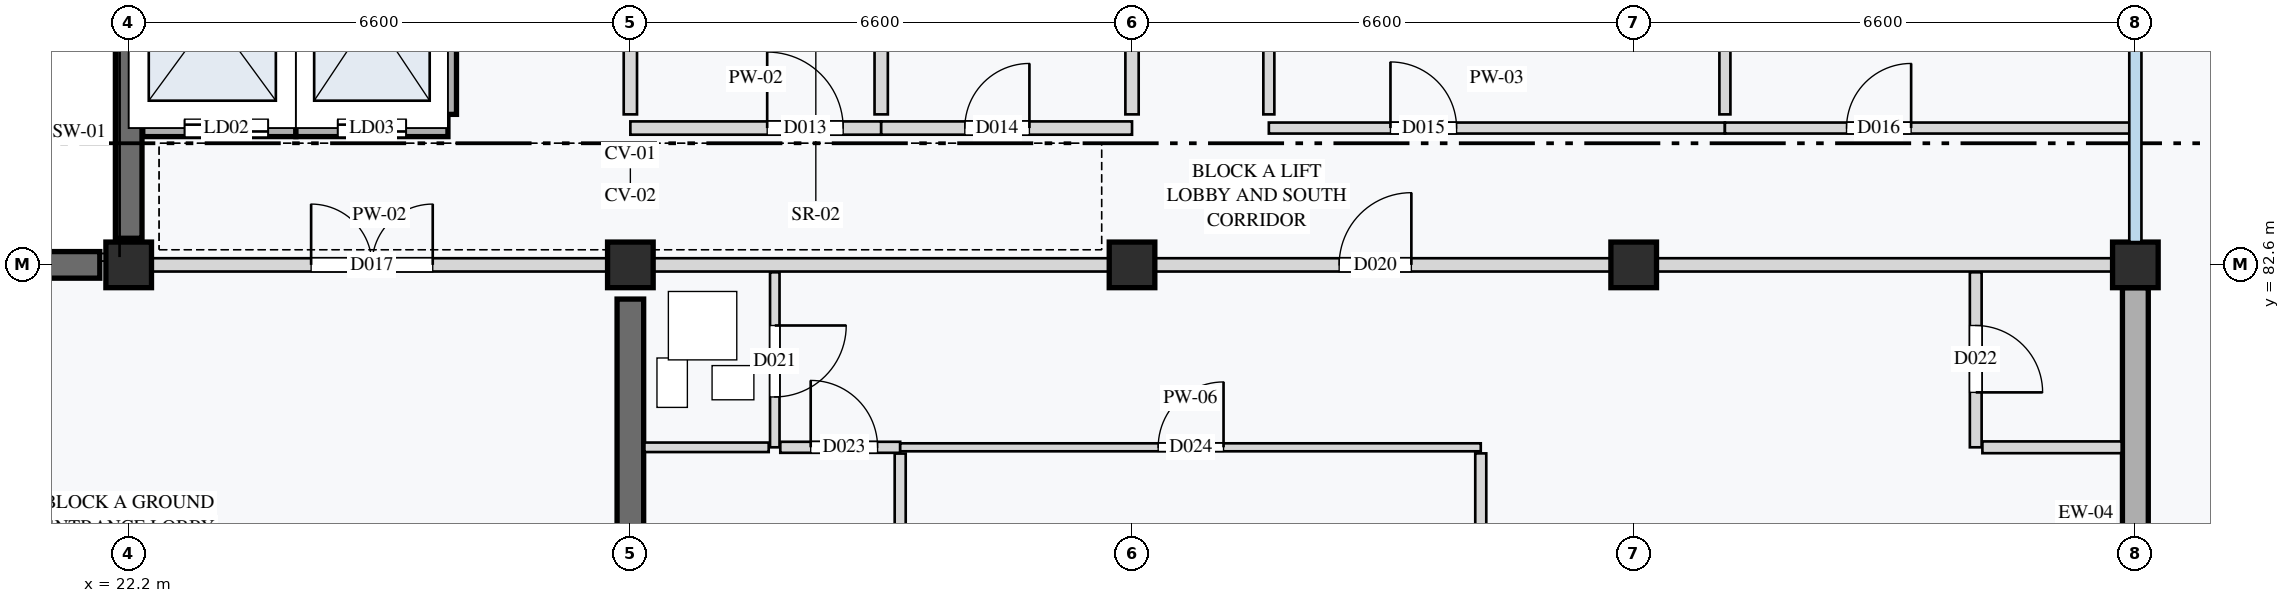
"""IFC4 building model, lengths in metres.
Left out: names, types, materials, properties, quantities, classifications, styles, units other than length and angle.
Written with IfcOpenShell. Run it as: python <this file> out.ifc"""

import sys

from ifc_helpers import new_model, si_unit, direction, frame, frame_2d, origin, origin_2d, place, context, subcontext, project, spatial, rectangle, extrude, element, fill, save


model = new_model("IFC4")
c1 = context("Model", 3, precision=1e-05, world=origin(), true_north=direction((0.0, 1.0)))
c2 = subcontext(c1, "Body", "Model", "MODEL_VIEW")
j1 = project(units=[si_unit("LENGTHUNIT", "METRE"), si_unit("PLANEANGLEUNIT", "RADIAN")], contexts=[c1])
p1 = place(None, origin())
s1 = spatial("IfcSite", under=j1, at=p1, CompositionType="ELEMENT")
p2 = place(p1, origin())
s2 = spatial("IfcBuilding", under=s1, at=p2, CompositionType="ELEMENT")
p3 = place(p2, origin())
s3 = spatial("IfcBuildingStorey", under=s2, at=p3, CompositionType="ELEMENT", Elevation=0.0)
for number, where, z_axis, x_axis in (
    (1, (22.2, 82.6, 0.0), (0.0, 0.0, 1.0), (1.0, 0.0, 0.0)),
    (2, (28.8, 82.6, 0.0), (0.0, 0.0, 1.0), (1.0, 0.0, 0.0)),
    (3, (35.4, 82.6, 0.0), (0.0, 0.0, 1.0), (1.0, 0.0, 0.0)),
    (4, (42.0, 82.6, 0.0), (0.0, 0.0, 1.0), (1.0, 0.0, 0.0)),
    (5, (48.6, 82.6, 0.0), (0.0, 0.0, 1.0), (1.0, 0.0, 0.0)),
):
    element("IfcColumn", number, at=place(p3, frame(where, z_axis=z_axis, x_axis=x_axis)), inside=s3, PredefinedType="COLUMN", context=c2, shape_type="SweptSolid", body=[
        extrude(rectangle(XDim=0.6, YDim=0.6, at=origin_2d()), origin(), (0.0, 0.0, 1.0), 4.2),
    ])
p4 = place(p3, frame((15.98, 82.6, 0.0), z_axis=(0.0, 0.0, 1.0), x_axis=(1.0, 0.0, 0.0)))
e6 = element("IfcWall", 6, at=p4, inside=s3, PredefinedType="SHEAR", context=c2, shape_type="SweptSolid", body=[
    extrude(rectangle(XDim=5.84, YDim=0.35, at=frame_2d((2.92, 0.0))), origin(), (0.0, 0.0, 1.0), 3.92),
])
p5 = place(p3, frame((22.2, 82.95, 0.0), z_axis=(0.0, 0.0, 1.0), x_axis=(0.0, 1.0, 0.0)))
e7 = element("IfcWall", 7, at=p5, inside=s3, PredefinedType="SHEAR", context=c2, shape_type="SweptSolid", body=[
    extrude(rectangle(XDim=2.8, YDim=0.35, at=frame_2d((1.4, 0.0))), origin(), (0.0, 0.0, 1.0), 3.92),
])
p6 = place(p3, frame((28.8, 76.45, 0.0), z_axis=(0.0, 0.0, 1.0), x_axis=(0.0, 1.0, 0.0)))
e8 = element("IfcWall", 8, at=p6, inside=s3, PredefinedType="SHEAR", context=c2, shape_type="SweptSolid", body=[
    extrude(rectangle(XDim=5.7, YDim=0.35, at=frame_2d((2.85, 0.0))), origin(), (0.0, 0.0, 1.0), 3.92),
])
p7 = place(p3, frame((48.6, 76.375, 0.0), z_axis=(0.0, 0.0, 1.0), x_axis=(0.0, 1.0, 0.0)))
e9 = element("IfcWall", 9, at=p7, inside=s3, PredefinedType="STANDARD", context=c2, shape_type="SweptSolid", body=[
    extrude(rectangle(XDim=5.925, YDim=0.34, at=frame_2d((2.962, 0.0))), origin(), (0.0, 0.0, 1.0), 3.65),
])
p8 = place(p3, frame((22.385, 84.4, 0.0), z_axis=(0.0, 0.0, 1.0), x_axis=(1.0, 0.0, 0.0)))
e10 = element("IfcWall", 10, at=p8, inside=s3, PredefinedType="STANDARD", context=c2, shape_type="SweptSolid", body=[
    extrude(rectangle(XDim=2.015, YDim=0.225, at=frame_2d((1.007, 0.0))), origin(), (0.0, 0.0, 1.0), 3.92),
])
p9 = place(p8, frame((0.55, 0.0, 0.0)))
e11 = element("IfcOpeningElement", 11, at=p9, cuts=e10, PredefinedType="OPENING", context=c2, shape_type="SweptSolid", body=[
    extrude(rectangle(XDim=1.1, YDim=2.1, at=frame_2d((0.55, 1.05))), frame((0.0, 0.123, 0.0), z_axis=(0.0, -1.0, 0.0), x_axis=(1.0, 0.0, 0.0)), (0.0, 0.0, 1.0), 0.245),
])
p10 = place(p3, frame((24.4, 84.4, 0.0), z_axis=(0.0, 0.0, 1.0), x_axis=(1.0, 0.0, 0.0)))
e12 = element("IfcWall", 12, at=p10, inside=s3, PredefinedType="STANDARD", context=c2, shape_type="SweptSolid", body=[
    extrude(rectangle(XDim=2.0, YDim=0.225, at=frame_2d((1.0, 0.0))), origin(), (0.0, 0.0, 1.0), 3.92),
])
p11 = place(p10, frame((0.55, 0.0, 0.0)))
e13 = element("IfcOpeningElement", 13, at=p11, cuts=e12, PredefinedType="OPENING", context=c2, shape_type="SweptSolid", body=[
    extrude(rectangle(XDim=0.9, YDim=2.1, at=frame_2d((0.45, 1.05))), frame((0.0, 0.123, 0.0), z_axis=(0.0, -1.0, 0.0), x_axis=(1.0, 0.0, 0.0)), (0.0, 0.0, 1.0), 0.245),
])
for number, where, z_axis, x_axis in (
    (14, (24.4, 84.58, 0.0), (0.0, 0.0, 1.0), (0.0, 1.0, 0.0)),
    (15, (26.4, 84.58, 0.0), (0.0, 0.0, 1.0), (0.0, 1.0, 0.0)),
):
    element("IfcWall", number, at=place(p3, frame(where, z_axis=z_axis, x_axis=x_axis)), inside=s3, PredefinedType="STANDARD", context=c2, shape_type="SweptSolid", body=[
        extrude(rectangle(XDim=2.64, YDim=0.225, at=frame_2d((1.32, 0.0))), origin(), (0.0, 0.0, 1.0), 3.92),
    ])
p12 = place(p3, frame((28.8, 84.4, 0.0), z_axis=(0.0, 0.0, 1.0), x_axis=(1.0, 0.0, 0.0)))
e16 = element("IfcWall", 16, at=p12, inside=s3, PredefinedType="PARTITIONING", context=c2, shape_type="SweptSolid", body=[
    extrude(rectangle(XDim=3.3, YDim=0.175, at=frame_2d((1.65, 0.0))), origin(), (0.0, 0.0, 1.0), 3.92),
])
p13 = place(p12, frame((1.8, 0.0, 0.0)))
e17 = element("IfcOpeningElement", 17, at=p13, cuts=e16, PredefinedType="OPENING", context=c2, shape_type="SweptSolid", body=[
    extrude(rectangle(XDim=1.0, YDim=2.1, at=frame_2d((0.5, 1.05))), frame((0.0, 0.097, 0.0), z_axis=(0.0, -1.0, 0.0), x_axis=(1.0, 0.0, 0.0)), (0.0, 0.0, 1.0), 0.195),
])
p14 = place(p3, frame((32.1, 84.4, 0.0), z_axis=(0.0, 0.0, 1.0), x_axis=(1.0, 0.0, 0.0)))
e18 = element("IfcWall", 18, at=p14, inside=s3, PredefinedType="PARTITIONING", context=c2, shape_type="SweptSolid", body=[
    extrude(rectangle(XDim=3.3, YDim=0.175, at=frame_2d((1.65, 0.0))), origin(), (0.0, 0.0, 1.0), 3.92),
])
p15 = place(p14, frame((1.1, 0.0, 0.0)))
e19 = element("IfcOpeningElement", 19, at=p15, cuts=e18, PredefinedType="OPENING", context=c2, shape_type="SweptSolid", body=[
    extrude(rectangle(XDim=0.85, YDim=2.0, at=frame_2d((0.425, 1.0))), frame((0.0, 0.097, 0.0), z_axis=(0.0, -1.0, 0.0), x_axis=(1.0, 0.0, 0.0)), (0.0, 0.0, 1.0), 0.195),
])
p16 = place(p3, frame((28.8, 84.58, 0.0), z_axis=(0.0, 0.0, 1.0), x_axis=(0.0, 1.0, 0.0)))
e20 = element("IfcWall", 20, at=p16, inside=s3, PredefinedType="PARTITIONING", context=c2, shape_type="SweptSolid", body=[
    extrude(rectangle(XDim=1.14, YDim=0.175, at=frame_2d((0.57, 0.0))), origin(), (0.0, 0.0, 1.0), 3.75),
])
for number, where, z_axis, x_axis in (
    (21, (32.1, 84.58, 0.0), (0.0, 0.0, 1.0), (0.0, 1.0, 0.0)),
    (22, (35.4, 84.58, 0.0), (0.0, 0.0, 1.0), (0.0, 1.0, 0.0)),
):
    element("IfcWall", number, at=place(p3, frame(where, z_axis=z_axis, x_axis=x_axis)), inside=s3, PredefinedType="PARTITIONING", context=c2, shape_type="SweptSolid", body=[
        extrude(rectangle(XDim=1.14, YDim=0.175, at=frame_2d((0.57, 0.0))), origin(), (0.0, 0.0, 1.0), 3.92),
    ])
p17 = place(p3, frame((37.2, 84.4, 0.0), z_axis=(0.0, 0.0, 1.0), x_axis=(1.0, 0.0, 0.0)))
e23 = element("IfcWall", 23, at=p17, inside=s3, PredefinedType="PARTITIONING", context=c2, shape_type="SweptSolid", body=[
    extrude(rectangle(XDim=6.0, YDim=0.145, at=frame_2d((3.0, 0.0))), origin(), (0.0, 0.0, 1.0), 3.92),
])
p18 = place(p17, frame((1.6, 0.0, 0.0)))
e24 = element("IfcOpeningElement", 24, at=p18, cuts=e23, PredefinedType="OPENING", context=c2, shape_type="SweptSolid", body=[
    extrude(rectangle(XDim=0.87, YDim=2.08, at=frame_2d((0.435, 1.04))), frame((0.0, 0.083, 0.0), z_axis=(0.0, -1.0, 0.0), x_axis=(1.0, 0.0, 0.0)), (0.0, 0.0, 1.0), 0.165),
])
p19 = place(p3, frame((43.2, 84.4, 0.0), z_axis=(0.0, 0.0, 1.0), x_axis=(1.0, 0.0, 0.0)))
e25 = element("IfcWall", 25, at=p19, inside=s3, PredefinedType="PARTITIONING", context=c2, shape_type="SweptSolid", body=[
    extrude(rectangle(XDim=5.4, YDim=0.145, at=frame_2d((2.7, 0.0))), origin(), (0.0, 0.0, 1.0), 3.92),
])
p20 = place(p19, frame((1.6, 0.0, 0.0)))
e26 = element("IfcOpeningElement", 26, at=p20, cuts=e25, PredefinedType="OPENING", context=c2, shape_type="SweptSolid", body=[
    extrude(rectangle(XDim=0.85, YDim=2.1, at=frame_2d((0.425, 1.05))), frame((0.0, 0.083, 0.0), z_axis=(0.0, -1.0, 0.0), x_axis=(1.0, 0.0, 0.0)), (0.0, 0.0, 1.0), 0.165),
])
for number, where, z_axis, x_axis in (
    (27, (43.2, 84.58, 0.0), (0.0, 0.0, 1.0), (0.0, 1.0, 0.0)),
    (28, (37.2, 84.58, 0.0), (0.0, 0.0, 1.0), (0.0, 1.0, 0.0)),
):
    element("IfcWall", number, at=place(p3, frame(where, z_axis=z_axis, x_axis=x_axis)), inside=s3, PredefinedType="PARTITIONING", context=c2, shape_type="SweptSolid", body=[
        extrude(rectangle(XDim=2.64, YDim=0.145, at=frame_2d((1.32, 0.0))), origin(), (0.0, 0.0, 1.0), 3.92),
    ])
p21 = place(p3, frame((22.2, 82.6, 0.0), z_axis=(0.0, 0.0, 1.0), x_axis=(1.0, 0.0, 0.0)))
e29 = element("IfcWall", 29, at=p21, inside=s3, PredefinedType="PARTITIONING", context=c2, shape_type="SweptSolid", body=[
    extrude(rectangle(XDim=6.6, YDim=0.175, at=frame_2d((3.3, 0.0))), origin(), (0.0, 0.0, 1.0), 3.55),
])
p22 = place(p21, frame((2.4, 0.0, 0.0)))
e30 = element("IfcOpeningElement", 30, at=p22, cuts=e29, PredefinedType="OPENING", context=c2, shape_type="SweptSolid", body=[
    extrude(rectangle(XDim=1.6, YDim=2.2, at=frame_2d((0.8, 1.1))), frame((0.0, 0.097, 0.0), z_axis=(0.0, -1.0, 0.0), x_axis=(1.0, 0.0, 0.0)), (0.0, 0.0, 1.0), 0.195),
])
p23 = place(p3, frame((28.8, 82.6, 0.0), z_axis=(0.0, 0.0, 1.0), x_axis=(1.0, 0.0, 0.0)))
e31 = element("IfcWall", 31, at=p23, inside=s3, PredefinedType="PARTITIONING", context=c2, shape_type="SweptSolid", body=[
    extrude(rectangle(XDim=19.8, YDim=0.175, at=frame_2d((9.9, 0.0))), origin(), (0.0, 0.0, 1.0), 3.55),
])
p24 = place(p23, frame((9.325, 0.0, 0.0)))
e32 = element("IfcOpeningElement", 32, at=p24, cuts=e31, PredefinedType="OPENING", context=c2, shape_type="SweptSolid", body=[
    extrude(rectangle(XDim=0.95, YDim=2.1, at=frame_2d((0.475, 1.05))), frame((0.0, 0.097, 0.0), z_axis=(0.0, -1.0, 0.0), x_axis=(1.0, 0.0, 0.0)), (0.0, 0.0, 1.0), 0.195),
])
p25 = place(p3, frame((30.7, 82.502, 0.0), z_axis=(0.0, 0.0, 1.0), x_axis=(0.0, -1.0, 0.0)))
e33 = element("IfcWall", 33, at=p25, inside=s3, PredefinedType="PARTITIONING", context=c2, shape_type="SweptSolid", body=[
    extrude(rectangle(XDim=2.302, YDim=0.125, at=frame_2d((1.151, 0.0))), origin(), (0.0, 0.0, 1.0), 3.92),
])
p26 = place(p25, frame((0.7, 0.0, 0.0)))
e34 = element("IfcOpeningElement", 34, at=p26, cuts=e33, PredefinedType="OPENING", context=c2, shape_type="SweptSolid", body=[
    extrude(rectangle(XDim=0.94, YDim=2.08, at=frame_2d((0.47, 1.04))), frame((0.0, 0.073, 0.0), z_axis=(0.0, -1.0, 0.0), x_axis=(1.0, 0.0, 0.0)), (0.0, 0.0, 1.0), 0.145),
])
p27 = place(p3, frame((28.985, 80.2, 0.0), z_axis=(0.0, 0.0, 1.0), x_axis=(1.0, 0.0, 0.0)))
e35 = element("IfcWall", 35, at=p27, inside=s3, PredefinedType="PARTITIONING", context=c2, shape_type="SweptSolid", body=[
    extrude(rectangle(XDim=1.635, YDim=0.125, at=frame_2d((0.817, 0.0))), origin(), (0.0, 0.0, 1.0), 3.92),
])
p28 = place(p3, frame((46.5, 82.502, 0.0), z_axis=(0.0, 0.0, 1.0), x_axis=(0.0, -1.0, 0.0)))
e36 = element("IfcWall", 36, at=p28, inside=s3, PredefinedType="PARTITIONING", context=c2, shape_type="SweptSolid", body=[
    extrude(rectangle(XDim=2.302, YDim=0.155, at=frame_2d((1.151, 0.0))), origin(), (0.0, 0.0, 1.0), 3.92),
])
p29 = place(p28, frame((0.7, 0.0, 0.0)))
e37 = element("IfcOpeningElement", 37, at=p29, cuts=e36, PredefinedType="OPENING", context=c2, shape_type="SweptSolid", body=[
    extrude(rectangle(XDim=0.88, YDim=2.1, at=frame_2d((0.44, 1.05))), frame((0.0, 0.087, 0.0), z_axis=(0.0, -1.0, 0.0), x_axis=(1.0, 0.0, 0.0)), (0.0, 0.0, 1.0), 0.175),
])
p30 = place(p3, frame((46.587, 80.2, 0.0), z_axis=(0.0, 0.0, 1.0), x_axis=(1.0, 0.0, 0.0)))
e38 = element("IfcWall", 38, at=p30, inside=s3, PredefinedType="PARTITIONING", context=c2, shape_type="SweptSolid", body=[
    extrude(rectangle(XDim=1.833, YDim=0.155, at=frame_2d((0.916, 0.0))), origin(), (0.0, 0.0, 1.0), 3.92),
])
p31 = place(p3, frame((30.772, 80.2, 0.0), z_axis=(0.0, 0.0, 1.0), x_axis=(1.0, 0.0, 0.0)))
e39 = element("IfcWall", 39, at=p31, inside=s3, PredefinedType="PARTITIONING", context=c2, shape_type="SweptSolid", body=[
    extrude(rectangle(XDim=1.578, YDim=0.145, at=frame_2d((0.789, 0.0))), origin(), (0.0, 0.0, 1.0), 3.92),
])
p32 = place(p31, frame((0.4, 0.0, 0.0)))
e40 = element("IfcOpeningElement", 40, at=p32, cuts=e39, PredefinedType="OPENING", context=c2, shape_type="SweptSolid", body=[
    extrude(rectangle(XDim=0.88, YDim=2.16, at=frame_2d((0.44, 1.08))), frame((0.0, 0.083, 0.0), z_axis=(0.0, -1.0, 0.0), x_axis=(1.0, 0.0, 0.0)), (0.0, 0.0, 1.0), 0.165),
])
p33 = place(p3, frame((32.35, 80.117, 0.0), z_axis=(0.0, 0.0, 1.0), x_axis=(0.0, -1.0, 0.0)))
e41 = element("IfcWall", 41, at=p33, inside=s3, PredefinedType="PARTITIONING", context=c2, shape_type="SweptSolid", body=[
    extrude(rectangle(XDim=3.938, YDim=0.145, at=frame_2d((1.969, 0.0))), origin(), (0.0, 0.0, 1.0), 3.92),
])
p34 = place(p3, frame((32.35, 80.2, 0.0), z_axis=(0.0, 0.0, 1.0), x_axis=(1.0, 0.0, 0.0)))
e42 = element("IfcWall", 42, at=p34, inside=s3, PredefinedType="PARTITIONING", context=c2, shape_type="SweptSolid", body=[
    extrude(rectangle(XDim=7.638, YDim=0.105, at=frame_2d((3.819, 0.0))), origin(), (0.0, 0.0, 1.0), 3.92),
])
p35 = place(p34, frame((3.394, 0.0, 0.0)))
e43 = element("IfcOpeningElement", 43, at=p35, cuts=e42, PredefinedType="OPENING", context=c2, shape_type="SweptSolid", body=[
    extrude(rectangle(XDim=0.86, YDim=2.12, at=frame_2d((0.43, 1.06))), frame((0.0, 0.062, 0.0), z_axis=(0.0, -1.0, 0.0), x_axis=(1.0, 0.0, 0.0)), (0.0, 0.0, 1.0), 0.125),
])
p36 = place(p3, frame((39.988, 80.12, 0.0), z_axis=(0.0, 0.0, 1.0), x_axis=(0.0, -1.0, 0.0)))
e44 = element("IfcWall", 44, at=p36, inside=s3, PredefinedType="PARTITIONING", context=c2, shape_type="SweptSolid", body=[
    extrude(rectangle(XDim=3.94, YDim=0.145, at=frame_2d((1.97, 0.0))), origin(), (0.0, 0.0, 1.0), 3.92),
])
p37 = place(p9, origin())
e45 = element("IfcDoor", 45, at=p37, inside=s3, OperationType="DOUBLE_DOOR_SLIDING", PredefinedType="DOOR", context=c2, shape_type="SweptSolid", body=[
    extrude(rectangle(XDim=1.1, YDim=2.1, at=frame_2d((0.55, 1.05))), frame((0.0, 0.025, 0.0), z_axis=(0.0, -1.0, 0.0), x_axis=(1.0, 0.0, 0.0)), (0.0, 0.0, 1.0), 0.05),
])
fill(e11, e45)
p38 = place(p11, origin())
e46 = element("IfcDoor", 46, at=p38, inside=s3, OperationType="DOUBLE_DOOR_SLIDING", PredefinedType="DOOR", context=c2, shape_type="SweptSolid", body=[
    extrude(rectangle(XDim=0.9, YDim=2.1, at=frame_2d((0.45, 1.05))), frame((0.0, 0.025, 0.0), z_axis=(0.0, -1.0, 0.0), x_axis=(1.0, 0.0, 0.0)), (0.0, 0.0, 1.0), 0.05),
])
fill(e13, e46)
p39 = place(p13, origin())
e47 = element("IfcDoor", 47, at=p39, inside=s3, OperationType="SINGLE_SWING_LEFT", PredefinedType="DOOR", context=c2, shape_type="SweptSolid", body=[
    extrude(rectangle(XDim=1.0, YDim=2.1, at=frame_2d((0.5, 1.05))), frame((0.0, 0.025, 0.0), z_axis=(0.0, -1.0, 0.0), x_axis=(1.0, 0.0, 0.0)), (0.0, 0.0, 1.0), 0.05),
])
fill(e17, e47)
p40 = place(p15, origin())
e48 = element("IfcDoor", 48, at=p40, inside=s3, OperationType="SINGLE_SWING_RIGHT", PredefinedType="DOOR", context=c2, shape_type="SweptSolid", body=[
    extrude(rectangle(XDim=0.85, YDim=2.0, at=frame_2d((0.425, 1.0))), frame((0.0, 0.025, 0.0), z_axis=(0.0, -1.0, 0.0), x_axis=(1.0, 0.0, 0.0)), (0.0, 0.0, 1.0), 0.05),
])
fill(e19, e48)
p41 = place(p18, origin())
e49 = element("IfcDoor", 49, at=p41, inside=s3, OperationType="SINGLE_SWING_LEFT", PredefinedType="DOOR", context=c2, shape_type="SweptSolid", body=[
    extrude(rectangle(XDim=0.87, YDim=2.08, at=frame_2d((0.435, 1.04))), frame((0.0, 0.025, 0.0), z_axis=(0.0, -1.0, 0.0), x_axis=(1.0, 0.0, 0.0)), (0.0, 0.0, 1.0), 0.05),
])
fill(e24, e49)
p42 = place(p20, origin())
e50 = element("IfcDoor", 50, at=p42, inside=s3, OperationType="SINGLE_SWING_RIGHT", PredefinedType="DOOR", context=c2, shape_type="SweptSolid", body=[
    extrude(rectangle(XDim=0.85, YDim=2.1, at=frame_2d((0.425, 1.05))), frame((0.0, 0.025, 0.0), z_axis=(0.0, -1.0, 0.0), x_axis=(1.0, 0.0, 0.0)), (0.0, 0.0, 1.0), 0.05),
])
fill(e26, e50)
p43 = place(p22, origin())
e51 = element("IfcDoor", 51, at=p43, inside=s3, OperationType="DOUBLE_DOOR_SINGLE_SWING", PredefinedType="DOOR", context=c2, shape_type="SweptSolid", body=[
    extrude(rectangle(XDim=1.6, YDim=2.2, at=frame_2d((0.8, 1.1))), frame((0.0, 0.025, 0.0), z_axis=(0.0, -1.0, 0.0), x_axis=(1.0, 0.0, 0.0)), (0.0, 0.0, 1.0), 0.05),
])
fill(e30, e51)
p44 = place(p24, origin())
e52 = element("IfcDoor", 52, at=p44, inside=s3, OperationType="SINGLE_SWING_RIGHT", PredefinedType="DOOR", context=c2, shape_type="SweptSolid", body=[
    extrude(rectangle(XDim=0.95, YDim=2.1, at=frame_2d((0.475, 1.05))), frame((0.0, 0.025, 0.0), z_axis=(0.0, -1.0, 0.0), x_axis=(1.0, 0.0, 0.0)), (0.0, 0.0, 1.0), 0.05),
])
fill(e32, e52)
p45 = place(p26, origin())
e53 = element("IfcDoor", 53, at=p45, inside=s3, OperationType="SINGLE_SWING_LEFT", PredefinedType="DOOR", context=c2, shape_type="SweptSolid", body=[
    extrude(rectangle(XDim=0.94, YDim=2.08, at=frame_2d((0.47, 1.04))), frame((0.0, 0.025, 0.0), z_axis=(0.0, -1.0, 0.0), x_axis=(1.0, 0.0, 0.0)), (0.0, 0.0, 1.0), 0.05),
])
fill(e34, e53)
p46 = place(p29, origin())
e54 = element("IfcDoor", 54, at=p46, inside=s3, OperationType="SINGLE_SWING_RIGHT", PredefinedType="DOOR", context=c2, shape_type="SweptSolid", body=[
    extrude(rectangle(XDim=0.88, YDim=2.1, at=frame_2d((0.44, 1.05))), frame((0.0, 0.025, 0.0), z_axis=(0.0, -1.0, 0.0), x_axis=(1.0, 0.0, 0.0)), (0.0, 0.0, 1.0), 0.05),
])
fill(e37, e54)
p47 = place(p32, origin())
e55 = element("IfcDoor", 55, at=p47, inside=s3, OperationType="SINGLE_SWING_LEFT", PredefinedType="DOOR", context=c2, shape_type="SweptSolid", body=[
    extrude(rectangle(XDim=0.88, YDim=2.16, at=frame_2d((0.44, 1.08))), frame((0.0, 0.025, 0.0), z_axis=(0.0, -1.0, 0.0), x_axis=(1.0, 0.0, 0.0)), (0.0, 0.0, 1.0), 0.05),
])
fill(e40, e55)
p48 = place(p35, origin())
e56 = element("IfcDoor", 56, at=p48, inside=s3, OperationType="SINGLE_SWING_RIGHT", PredefinedType="DOOR", context=c2, shape_type="SweptSolid", body=[
    extrude(rectangle(XDim=0.86, YDim=2.12, at=frame_2d((0.43, 1.06))), frame((0.0, 0.025, 0.0), z_axis=(0.0, -1.0, 0.0), x_axis=(1.0, 0.0, 0.0)), (0.0, 0.0, 1.0), 0.05),
])
fill(e43, e56)
save(model, sys.argv[1])
